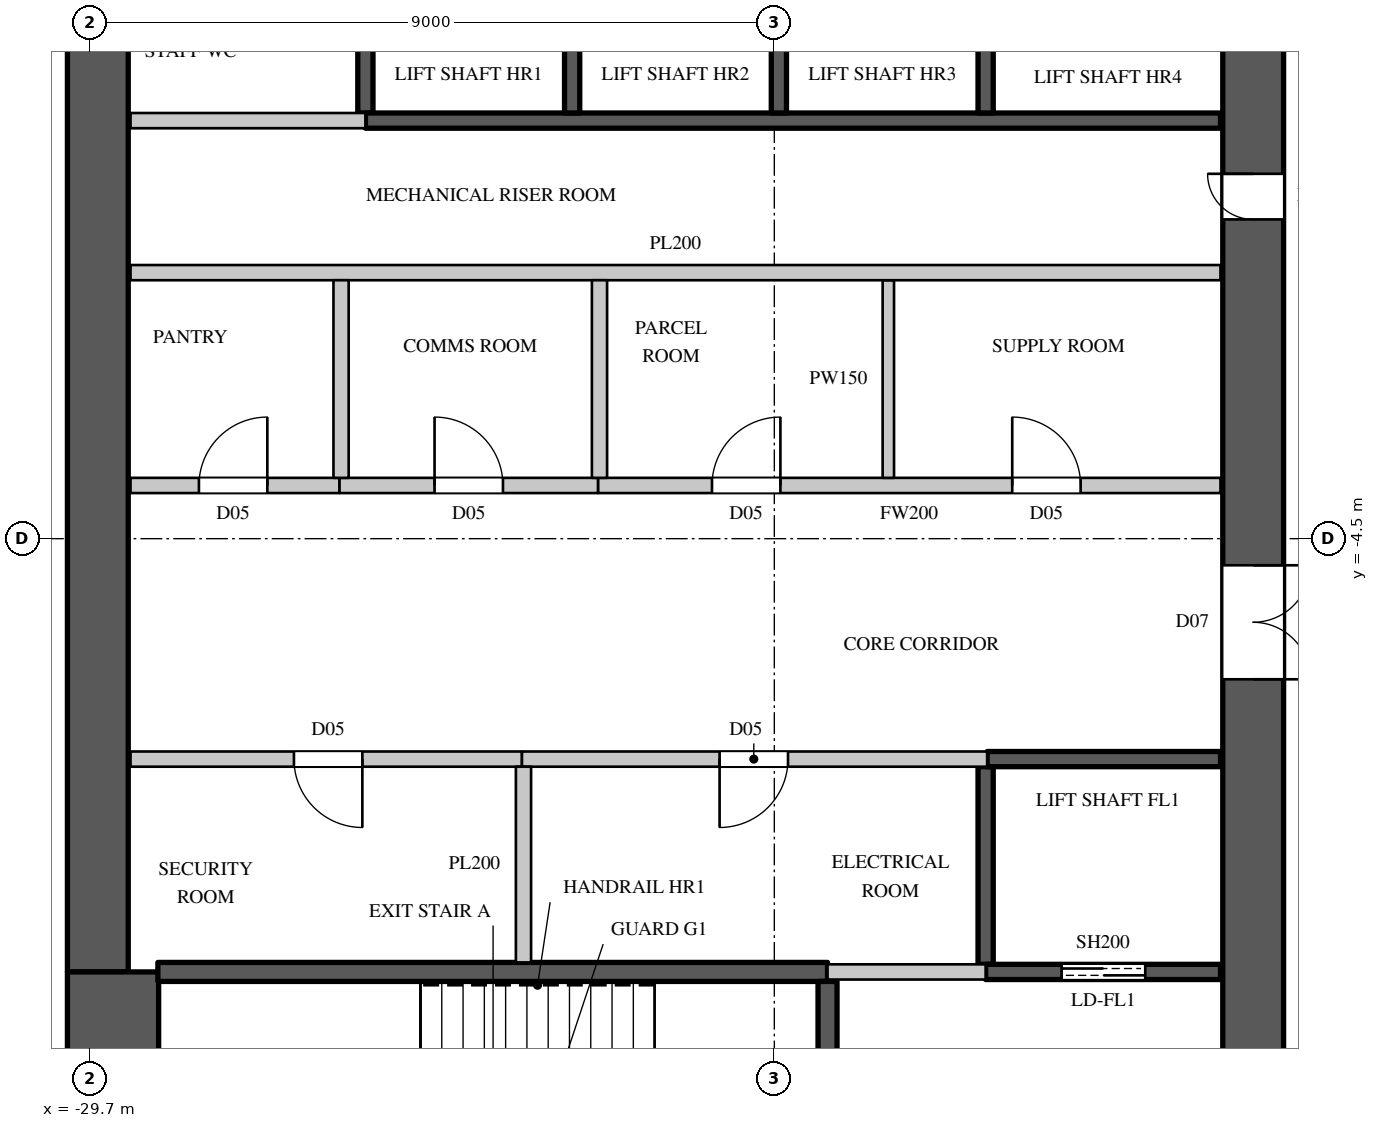
"""IFC4 building model, lengths in metres.
Left out: names, types, materials, properties, quantities, classifications, styles, units other than length and angle.
Written with IfcOpenShell. Run it as: python <this file> out.ifc"""

import sys

from ifc_helpers import new_model, si_unit, direction, frame, frame_2d, origin, place, context, subcontext, project, spatial, rectangle, extrude, element, fill, save


model = new_model("IFC4")
c1 = context("Model", 3, precision=1e-05, world=origin(), true_north=direction((0.0, 1.0)))
c2 = subcontext(c1, "Body", "Model", "MODEL_VIEW")
j1 = project(units=[si_unit("LENGTHUNIT", "METRE"), si_unit("PLANEANGLEUNIT", "RADIAN")], contexts=[c1])
p1 = place(None, origin())
s1 = spatial("IfcSite", under=j1, at=p1, CompositionType="ELEMENT")
p2 = place(p1, origin())
s2 = spatial("IfcBuilding", under=s1, at=p2, CompositionType="ELEMENT")
p3 = place(p2, frame((0.0, 0.0, 185.1)))
s3 = spatial("IfcBuildingStorey", under=s2, at=p3, CompositionType="ELEMENT", Elevation=185.1)
p4 = place(p3, frame((-14.4, -14.8, 0.0), z_axis=(0.0, 0.0, 1.0), x_axis=(0.0, 1.0, 0.0)))
e1 = element("IfcWall", 1, at=p4, inside=s3, PredefinedType="SHEAR", context=c2, shape_type="SweptSolid", body=[
    extrude(rectangle(XDim=29.6, YDim=0.8, at=frame_2d((14.8, 0.0))), origin(), (0.0, 0.0, 1.0), 4.1),
])
p5 = place(p4, frame((1.55, 0.0, 0.0)))
e2 = element("IfcOpeningElement", 2, at=p5, cuts=e1, PredefinedType="OPENING", context=c2, shape_type="SweptSolid", body=[
    extrude(rectangle(XDim=1.5, YDim=2.4, at=frame_2d((0.75, 1.2))), frame((0.0, 0.41, 0.0), z_axis=(0.0, -1.0, 0.0), x_axis=(1.0, 0.0, 0.0)), (0.0, 0.0, 1.0), 0.82),
])
p6 = place(p4, frame((26.55, 0.0, 0.0)))
e3 = element("IfcOpeningElement", 3, at=p6, cuts=e1, PredefinedType="OPENING", context=c2, shape_type="SweptSolid", body=[
    extrude(rectangle(XDim=1.5, YDim=2.4, at=frame_2d((0.75, 1.2))), frame((0.0, 0.41, 0.0), z_axis=(0.0, -1.0, 0.0), x_axis=(1.0, 0.0, 0.0)), (0.0, 0.0, 1.0), 0.82),
])
p7 = place(p4, frame((8.45, 0.0, 0.0)))
e4 = element("IfcOpeningElement", 4, at=p7, cuts=e1, PredefinedType="OPENING", context=c2, shape_type="SweptSolid", body=[
    extrude(rectangle(XDim=1.5, YDim=2.4, at=frame_2d((0.75, 1.2))), frame((0.0, 0.41, 0.0), z_axis=(0.0, -1.0, 0.0), x_axis=(1.0, 0.0, 0.0)), (0.0, 0.0, 1.0), 0.82),
])
p8 = place(p4, frame((19.65, 0.0, 0.0)))
e5 = element("IfcOpeningElement", 5, at=p8, cuts=e1, PredefinedType="OPENING", context=c2, shape_type="SweptSolid", body=[
    extrude(rectangle(XDim=1.5, YDim=2.4, at=frame_2d((0.75, 1.2))), frame((0.0, 0.41, 0.0), z_axis=(0.0, -1.0, 0.0), x_axis=(1.0, 0.0, 0.0)), (0.0, 0.0, 1.0), 0.82),
])
p9 = place(p4, frame((14.5, 0.0, 0.0)))
e6 = element("IfcOpeningElement", 6, at=p9, cuts=e1, PredefinedType="OPENING", context=c2, shape_type="SweptSolid", body=[
    extrude(rectangle(XDim=0.6, YDim=2.0, at=frame_2d((0.3, 1.0))), frame((0.0, 0.41, 0.0), z_axis=(0.0, -1.0, 0.0), x_axis=(1.0, 0.0, 0.0)), (0.0, 0.0, 1.0), 0.82),
])
p10 = place(p3, frame((-29.6, -10.2, 0.0), z_axis=(0.0, 0.0, 1.0), x_axis=(0.0, 1.0, 0.0)))
e7 = element("IfcWall", 7, at=p10, inside=s3, PredefinedType="SHEAR", context=c2, shape_type="SweptSolid", body=[
    extrude(rectangle(XDim=20.4, YDim=0.8, at=frame_2d((10.2, 0.0))), origin(), (0.0, 0.0, 1.0), 4.1),
])
p11 = place(p3, frame((-29.4, -14.8, 0.0), z_axis=(0.0, 0.0, 1.0), x_axis=(0.0, 1.0, 0.0)))
e8 = element("IfcWall", 8, at=p11, inside=s3, PredefinedType="SHEAR", context=c2, shape_type="SweptSolid", body=[
    extrude(rectangle(XDim=4.6, YDim=1.2, at=frame_2d((2.3, 0.0))), origin(), (0.0, 0.0, 1.0), 4.1),
])
p12 = place(p3, frame((-29.17, -7.4, 0.0), z_axis=(0.0, 0.0, 1.0), x_axis=(1.0, 0.0, 0.0)))
e9 = element("IfcWall", 9, at=p12, inside=s3, PredefinedType="PARTITIONING", context=c2, shape_type="SweptSolid", body=[
    extrude(rectangle(XDim=5.15, YDim=0.2, at=frame_2d((2.575, 0.0))), origin(), (0.0, 0.0, 1.0), 3.8),
])
p13 = place(p12, frame((2.15, 0.0, 0.0)))
e10 = element("IfcOpeningElement", 10, at=p13, cuts=e9, PredefinedType="OPENING", context=c2, shape_type="SweptSolid", body=[
    extrude(rectangle(XDim=0.9, YDim=2.2, at=frame_2d((0.45, 1.1))), frame((0.0, 0.11, 0.0), z_axis=(0.0, -1.0, 0.0), x_axis=(1.0, 0.0, 0.0)), (0.0, 0.0, 1.0), 0.22),
])
p14 = place(p3, frame((-29.17, -3.8, 0.0), z_axis=(0.0, 0.0, 1.0), x_axis=(1.0, 0.0, 0.0)))
e11 = element("IfcWall", 11, at=p14, inside=s3, PredefinedType="PARTITIONING", context=c2, shape_type="SweptSolid", body=[
    extrude(rectangle(XDim=2.75, YDim=0.2, at=frame_2d((1.375, 0.0))), origin(), (0.0, 0.0, 1.0), 3.8),
])
p15 = place(p14, frame((0.9, 0.0, 0.0)))
e12 = element("IfcOpeningElement", 12, at=p15, cuts=e11, PredefinedType="OPENING", context=c2, shape_type="SweptSolid", body=[
    extrude(rectangle(XDim=0.9, YDim=2.2, at=frame_2d((0.45, 1.1))), frame((0.0, 0.11, 0.0), z_axis=(0.0, -1.0, 0.0), x_axis=(1.0, 0.0, 0.0)), (0.0, 0.0, 1.0), 0.22),
])
p16 = place(p3, frame((-23.02, -3.8, 0.0), z_axis=(0.0, 0.0, 1.0), x_axis=(1.0, 0.0, 0.0)))
e13 = element("IfcWall", 13, at=p16, inside=s3, PredefinedType="PARTITIONING", context=c2, shape_type="SweptSolid", body=[
    extrude(rectangle(XDim=8.19, YDim=0.2, at=frame_2d((4.095, 0.0))), origin(), (0.0, 0.0, 1.0), 3.8),
])
p17 = place(p16, frame((1.5, 0.0, 0.0)))
e14 = element("IfcOpeningElement", 14, at=p17, cuts=e13, PredefinedType="OPENING", context=c2, shape_type="SweptSolid", body=[
    extrude(rectangle(XDim=0.9, YDim=2.2, at=frame_2d((0.45, 1.1))), frame((0.0, 0.11, 0.0), z_axis=(0.0, -1.0, 0.0), x_axis=(1.0, 0.0, 0.0)), (0.0, 0.0, 1.0), 0.22),
])
p18 = place(p16, frame((5.45, 0.0, 0.0)))
e15 = element("IfcOpeningElement", 15, at=p18, cuts=e13, PredefinedType="OPENING", context=c2, shape_type="SweptSolid", body=[
    extrude(rectangle(XDim=0.9, YDim=2.2, at=frame_2d((0.45, 1.1))), frame((0.0, 0.11, 0.0), z_axis=(0.0, -1.0, 0.0), x_axis=(1.0, 0.0, 0.0)), (0.0, 0.0, 1.0), 0.22),
])
p19 = place(p3, frame((-19.2, -3.7, 0.0), z_axis=(0.0, 0.0, 1.0), x_axis=(0.0, 1.0, 0.0)))
e16 = element("IfcWall", 16, at=p19, inside=s3, PredefinedType="PARTITIONING", context=c2, shape_type="SweptSolid", body=[
    extrude(rectangle(XDim=2.6, YDim=0.15, at=frame_2d((1.3, 0.0))), origin(), (0.0, 0.0, 1.0), 3.8),
])
p20 = place(p3, frame((-29.17, -1.0, 0.0), z_axis=(0.0, 0.0, 1.0), x_axis=(1.0, 0.0, 0.0)))
e17 = element("IfcWall", 17, at=p20, inside=s3, PredefinedType="PARTITIONING", context=c2, shape_type="SweptSolid", body=[
    extrude(rectangle(XDim=14.34, YDim=0.2, at=frame_2d((7.17, 0.0))), origin(), (0.0, 0.0, 1.0), 3.8),
])
p21 = place(p3, frame((-29.17, 1.0, 0.0), z_axis=(0.0, 0.0, 1.0), x_axis=(1.0, 0.0, 0.0)))
e18 = element("IfcWall", 18, at=p21, inside=s3, PredefinedType="PARTITIONING", context=c2, shape_type="SweptSolid", body=[
    extrude(rectangle(XDim=3.09, YDim=0.2, at=frame_2d((1.545, 0.0))), origin(), (0.0, 0.0, 1.0), 3.8),
])
p22 = place(p3, frame((-26.42, -3.8, 0.0), z_axis=(0.0, 0.0, 1.0), x_axis=(1.0, 0.0, 0.0)))
e19 = element("IfcWall", 19, at=p22, inside=s3, PredefinedType="PARTITIONING", context=c2, shape_type="SweptSolid", body=[
    extrude(rectangle(XDim=3.4, YDim=0.2, at=frame_2d((1.7, 0.0))), origin(), (0.0, 0.0, 1.0), 3.8),
])
p23 = place(p22, frame((1.25, 0.0, 0.0)))
e20 = element("IfcOpeningElement", 20, at=p23, cuts=e19, PredefinedType="OPENING", context=c2, shape_type="SweptSolid", body=[
    extrude(rectangle(XDim=0.9, YDim=2.2, at=frame_2d((0.45, 1.1))), frame((0.0, 0.11, 0.0), z_axis=(0.0, -1.0, 0.0), x_axis=(1.0, 0.0, 0.0)), (0.0, 0.0, 1.0), 0.22),
])
p24 = place(p3, frame((-26.4, -3.7, 0.0), z_axis=(0.0, 0.0, 1.0), x_axis=(0.0, 1.0, 0.0)))
e21 = element("IfcWall", 21, at=p24, inside=s3, PredefinedType="PARTITIONING", context=c2, shape_type="SweptSolid", body=[
    extrude(rectangle(XDim=2.6, YDim=0.2, at=frame_2d((1.3, 0.0))), origin(), (0.0, 0.0, 1.0), 3.8),
])
p25 = place(p3, frame((-24.02, -7.4, 0.0), z_axis=(0.0, 0.0, 1.0), x_axis=(1.0, 0.0, 0.0)))
e22 = element("IfcWall", 22, at=p25, inside=s3, PredefinedType="PARTITIONING", context=c2, shape_type="SweptSolid", body=[
    extrude(rectangle(XDim=6.12, YDim=0.2, at=frame_2d((3.06, 0.0))), origin(), (0.0, 0.0, 1.0), 3.8),
])
p26 = place(p25, frame((2.6, 0.0, 0.0)))
e23 = element("IfcOpeningElement", 23, at=p26, cuts=e22, PredefinedType="OPENING", context=c2, shape_type="SweptSolid", body=[
    extrude(rectangle(XDim=0.9, YDim=2.2, at=frame_2d((0.45, 1.1))), frame((0.0, 0.11, 0.0), z_axis=(0.0, -1.0, 0.0), x_axis=(1.0, 0.0, 0.0)), (0.0, 0.0, 1.0), 0.22),
])
p27 = place(p3, frame((-24.0, -10.075, 0.0), z_axis=(0.0, 0.0, 1.0), x_axis=(0.0, 1.0, 0.0)))
e24 = element("IfcWall", 24, at=p27, inside=s3, PredefinedType="PARTITIONING", context=c2, shape_type="SweptSolid", body=[
    extrude(rectangle(XDim=2.575, YDim=0.2, at=frame_2d((1.288, 0.0))), origin(), (0.0, 0.0, 1.0), 3.8),
])
p28 = place(p3, frame((-23.0, -3.7, 0.0), z_axis=(0.0, 0.0, 1.0), x_axis=(0.0, 1.0, 0.0)))
e25 = element("IfcWall", 25, at=p28, inside=s3, PredefinedType="PARTITIONING", context=c2, shape_type="SweptSolid", body=[
    extrude(rectangle(XDim=2.6, YDim=0.2, at=frame_2d((1.3, 0.0))), origin(), (0.0, 0.0, 1.0), 3.8),
])
p29 = place(p3, frame((-20.0, -10.2, 0.0), z_axis=(0.0, 0.0, 1.0), x_axis=(1.0, 0.0, 0.0)))
e26 = element("IfcWall", 26, at=p29, inside=s3, PredefinedType="PARTITIONING", context=c2, shape_type="SweptSolid", body=[
    extrude(rectangle(XDim=2.08, YDim=0.2, at=frame_2d((1.04, 0.0))), origin(), (0.0, 0.0, 1.0), 3.8),
])
p30 = place(p3, frame((-26.08, 1.1, 0.0), z_axis=(0.0, 0.0, 1.0), x_axis=(0.0, 1.0, 0.0)))
e27 = element("IfcWall", 27, at=p30, inside=s3, PredefinedType="SHEAR", context=c2, shape_type="SweptSolid", body=[
    extrude(rectangle(XDim=2.6, YDim=0.2, at=frame_2d((1.3, 0.0))), origin(), (0.0, 0.0, 1.0), 3.8),
])
p31 = place(p3, frame((-26.08, 1.0, 0.0), z_axis=(0.0, 0.0, 1.0), x_axis=(1.0, 0.0, 0.0)))
e28 = element("IfcWall", 28, at=p31, inside=s3, PredefinedType="SHEAR", context=c2, shape_type="SweptSolid", body=[
    extrude(rectangle(XDim=11.25, YDim=0.2, at=frame_2d((5.625, 0.0))), origin(), (0.0, 0.0, 1.0), 3.8),
])
for number, where, z_axis, x_axis in (
    (29, (-23.36, 1.1, 0.0), (0.0, 0.0, 1.0), (0.0, 1.0, 0.0)),
    (30, (-20.64, 1.1, 0.0), (0.0, 0.0, 1.0), (0.0, 1.0, 0.0)),
):
    element("IfcWall", number, at=place(p3, frame(where, z_axis=z_axis, x_axis=x_axis)), inside=s3, PredefinedType="SHEAR", context=c2, shape_type="SweptSolid", body=[
        extrude(rectangle(XDim=2.6, YDim=0.2, at=frame_2d((1.3, 0.0))), origin(), (0.0, 0.0, 1.0), 4.1),
    ])
p32 = place(p3, frame((-17.92, -10.1, 0.0), z_axis=(0.0, 0.0, 1.0), x_axis=(0.0, 1.0, 0.0)))
e31 = element("IfcWall", 31, at=p32, inside=s3, PredefinedType="SHEAR", context=c2, shape_type="SweptSolid", body=[
    extrude(rectangle(XDim=2.6, YDim=0.2, at=frame_2d((1.3, 0.0))), origin(), (0.0, 0.0, 1.0), 3.8),
])
p33 = place(p3, frame((-17.92, -10.2, 0.0), z_axis=(0.0, 0.0, 1.0), x_axis=(1.0, 0.0, 0.0)))
e32 = element("IfcWall", 32, at=p33, inside=s3, PredefinedType="SHEAR", context=c2, shape_type="SweptSolid", body=[
    extrude(rectangle(XDim=3.09, YDim=0.2, at=frame_2d((1.545, 0.0))), origin(), (0.0, 0.0, 1.0), 3.8),
])
p34 = place(p33, frame((1.0, 0.0, 0.0)))
e33 = element("IfcOpeningElement", 33, at=p34, cuts=e32, PredefinedType="OPENING", context=c2, shape_type="SweptSolid", body=[
    extrude(rectangle(XDim=1.1, YDim=2.2, at=frame_2d((0.55, 1.1))), frame((0.0, 0.11, 0.0), z_axis=(0.0, -1.0, 0.0), x_axis=(1.0, 0.0, 0.0)), (0.0, 0.0, 1.0), 0.22),
])
p35 = place(p3, frame((-17.9, -7.4, 0.0), z_axis=(0.0, 0.0, 1.0), x_axis=(1.0, 0.0, 0.0)))
e34 = element("IfcWall", 34, at=p35, inside=s3, PredefinedType="SHEAR", context=c2, shape_type="SweptSolid", body=[
    extrude(rectangle(XDim=3.07, YDim=0.2, at=frame_2d((1.535, 0.0))), origin(), (0.0, 0.0, 1.0), 3.8),
])
p36 = place(p3, frame((-17.92, 1.1, 0.0), z_axis=(0.0, 0.0, 1.0), x_axis=(0.0, 1.0, 0.0)))
e35 = element("IfcWall", 35, at=p36, inside=s3, PredefinedType="SHEAR", context=c2, shape_type="SweptSolid", body=[
    extrude(rectangle(XDim=2.6, YDim=0.2, at=frame_2d((1.3, 0.0))), origin(), (0.0, 0.0, 1.0), 4.1),
])
p37 = place(p3, frame((-28.81, -10.2, 0.0), z_axis=(0.0, 0.0, 1.0), x_axis=(1.0, 0.0, 0.0)))
e36 = element("IfcWall", 36, at=p37, inside=s3, PredefinedType="SHEAR", context=c2, shape_type="SweptSolid", body=[
    extrude(rectangle(XDim=8.81, YDim=0.25, at=frame_2d((4.405, 0.0))), origin(), (0.0, 0.0, 1.0), 3.8),
])
p38 = place(p3, frame((-20.0, -14.77, 0.0), z_axis=(0.0, 0.0, 1.0), x_axis=(0.0, 1.0, 0.0)))
e37 = element("IfcWall", 37, at=p38, inside=s3, PredefinedType="SHEAR", context=c2, shape_type="SweptSolid", body=[
    extrude(rectangle(XDim=4.445, YDim=0.25, at=frame_2d((2.223, 0.0))), origin(), (0.0, 0.0, 1.0), 3.8),
])
p39 = place(p38, frame((1.7, 0.0, 0.0)))
e38 = element("IfcOpeningElement", 38, at=p39, cuts=e37, PredefinedType="OPENING", context=c2, shape_type="SweptSolid", body=[
    extrude(rectangle(XDim=1.1, YDim=2.2, at=frame_2d((0.55, 1.1))), frame((0.0, 0.135, 0.0), z_axis=(0.0, -1.0, 0.0), x_axis=(1.0, 0.0, 0.0)), (0.0, 0.0, 1.0), 0.27),
])
p40 = place(p13, origin())
e39 = element("IfcDoor", 39, at=p40, inside=s3, OperationType="SINGLE_SWING_LEFT", PredefinedType="DOOR", context=c2, shape_type="SweptSolid", body=[
    extrude(rectangle(XDim=0.9, YDim=2.2, at=frame_2d((0.45, 1.1))), frame((0.0, 0.025, 0.0), z_axis=(0.0, -1.0, 0.0), x_axis=(1.0, 0.0, 0.0)), (0.0, 0.0, 1.0), 0.05),
])
fill(e10, e39)
p41 = place(p26, origin())
e40 = element("IfcDoor", 40, at=p41, inside=s3, OperationType="SINGLE_SWING_RIGHT", PredefinedType="DOOR", context=c2, shape_type="SweptSolid", body=[
    extrude(rectangle(XDim=0.9, YDim=2.2, at=frame_2d((0.45, 1.1))), frame((0.0, 0.025, 0.0), z_axis=(0.0, -1.0, 0.0), x_axis=(1.0, 0.0, 0.0)), (0.0, 0.0, 1.0), 0.05),
])
fill(e23, e40)
p42 = place(p15, origin())
e41 = element("IfcDoor", 41, at=p42, inside=s3, OperationType="SINGLE_SWING_RIGHT", PredefinedType="DOOR", context=c2, shape_type="SweptSolid", body=[
    extrude(rectangle(XDim=0.9, YDim=2.2, at=frame_2d((0.45, 1.1))), frame((0.0, 0.025, 0.0), z_axis=(0.0, -1.0, 0.0), x_axis=(1.0, 0.0, 0.0)), (0.0, 0.0, 1.0), 0.05),
])
fill(e12, e41)
p43 = place(p23, origin())
e42 = element("IfcDoor", 42, at=p43, inside=s3, OperationType="SINGLE_SWING_LEFT", PredefinedType="DOOR", context=c2, shape_type="SweptSolid", body=[
    extrude(rectangle(XDim=0.9, YDim=2.2, at=frame_2d((0.45, 1.1))), frame((0.0, 0.025, 0.0), z_axis=(0.0, -1.0, 0.0), x_axis=(1.0, 0.0, 0.0)), (0.0, 0.0, 1.0), 0.05),
])
fill(e20, e42)
p44 = place(p17, origin())
e43 = element("IfcDoor", 43, at=p44, inside=s3, OperationType="SINGLE_SWING_RIGHT", PredefinedType="DOOR", context=c2, shape_type="SweptSolid", body=[
    extrude(rectangle(XDim=0.9, YDim=2.2, at=frame_2d((0.45, 1.1))), frame((0.0, 0.025, 0.0), z_axis=(0.0, -1.0, 0.0), x_axis=(1.0, 0.0, 0.0)), (0.0, 0.0, 1.0), 0.05),
])
fill(e14, e43)
p45 = place(p18, origin())
e44 = element("IfcDoor", 44, at=p45, inside=s3, OperationType="SINGLE_SWING_LEFT", PredefinedType="DOOR", context=c2, shape_type="SweptSolid", body=[
    extrude(rectangle(XDim=0.9, YDim=2.2, at=frame_2d((0.45, 1.1))), frame((0.0, 0.025, 0.0), z_axis=(0.0, -1.0, 0.0), x_axis=(1.0, 0.0, 0.0)), (0.0, 0.0, 1.0), 0.05),
])
fill(e15, e44)
p46 = place(p34, origin())
e45 = element("IfcDoor", 45, at=p46, inside=s3, OperationType="DOUBLE_DOOR_SLIDING", PredefinedType="DOOR", context=c2, shape_type="SweptSolid", body=[
    extrude(rectangle(XDim=1.1, YDim=2.2, at=frame_2d((0.55, 1.1))), frame((0.0, 0.025, 0.0), z_axis=(0.0, -1.0, 0.0), x_axis=(1.0, 0.0, 0.0)), (0.0, 0.0, 1.0), 0.05),
])
fill(e33, e45)
p47 = place(p7, origin())
e46 = element("IfcDoor", 46, at=p47, inside=s3, OperationType="DOUBLE_DOOR_SINGLE_SWING", PredefinedType="DOOR", context=c2, shape_type="SweptSolid", body=[
    extrude(rectangle(XDim=1.5, YDim=2.4, at=frame_2d((0.75, 1.2))), frame((0.0, -0.345, 0.0), z_axis=(0.0, -1.0, 0.0), x_axis=(1.0, 0.0, 0.0)), (0.0, 0.0, 1.0), 0.05),
])
fill(e4, e46)
p48 = place(p9, origin())
e47 = element("IfcDoor", 47, at=p48, inside=s3, OperationType="SINGLE_SWING_RIGHT", PredefinedType="DOOR", context=c2, shape_type="SweptSolid", body=[
    extrude(rectangle(XDim=0.6, YDim=2.0, at=frame_2d((0.3, 1.0))), frame((0.0, 0.395, 0.0), z_axis=(0.0, -1.0, 0.0), x_axis=(1.0, 0.0, 0.0)), (0.0, 0.0, 1.0), 0.05),
])
fill(e6, e47)
save(model, sys.argv[1])
